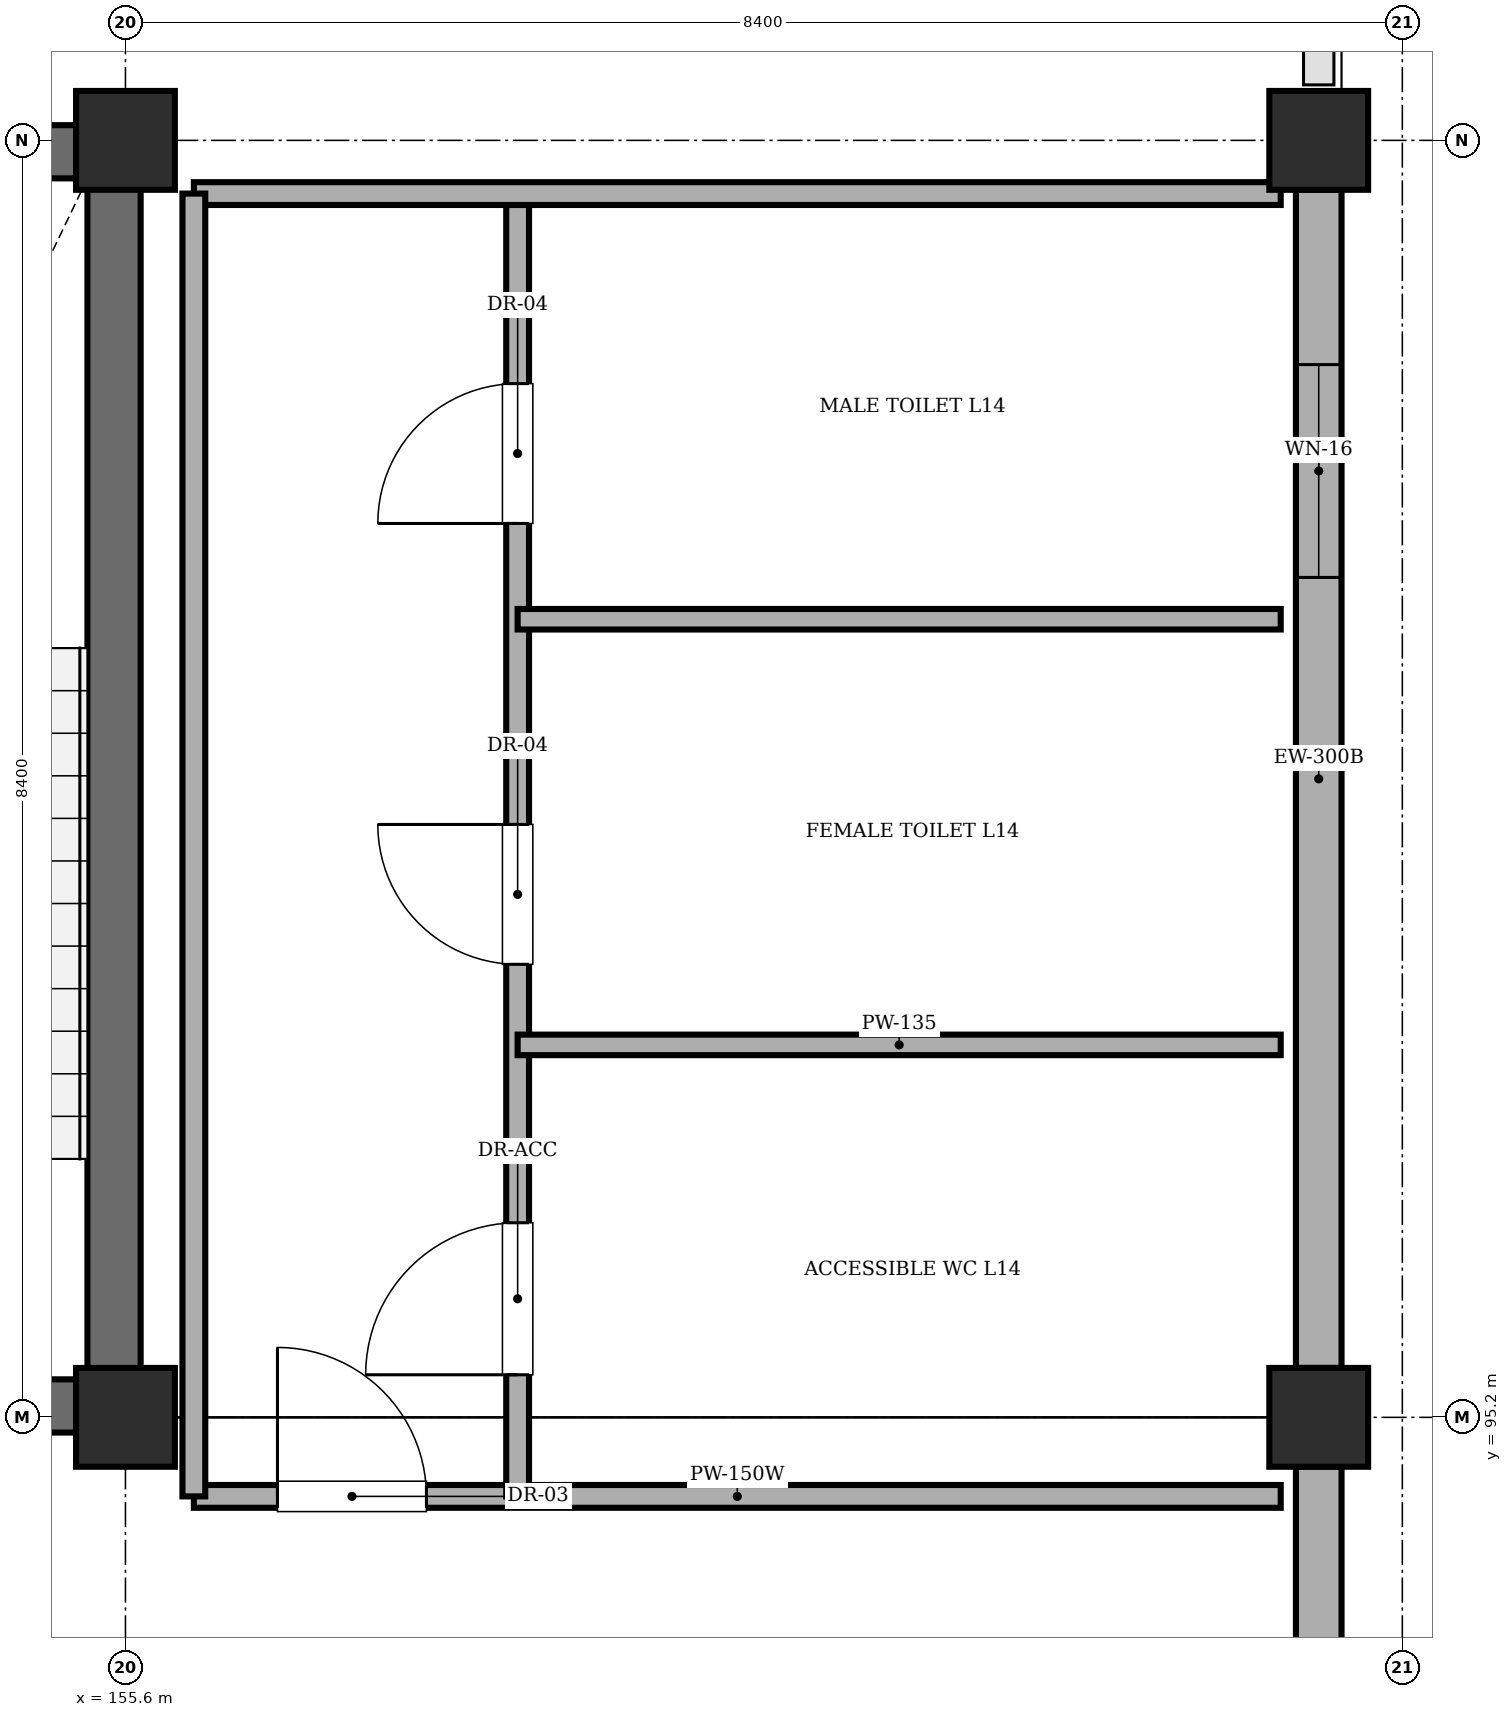
"""IFC4 building model, lengths in metres.
Left out: names, types, materials, properties, quantities, classifications, styles, units other than length and angle.
Written with IfcOpenShell. Run it as: python <this file> out.ifc"""

import sys

from ifc_helpers import new_model, si_unit, direction, frame, frame_2d, origin, origin_2d, place, context, subcontext, project, spatial, rectangle, extrude, element, fill, save


model = new_model("IFC4")
c1 = context("Model", 3, precision=1e-05, world=origin(), true_north=direction((0.0, 1.0)))
c2 = subcontext(c1, "Body", "Model", "MODEL_VIEW")
j1 = project(units=[si_unit("LENGTHUNIT", "METRE"), si_unit("PLANEANGLEUNIT", "RADIAN")], contexts=[c1])
p1 = place(None, origin())
s1 = spatial("IfcSite", under=j1, at=p1, CompositionType="ELEMENT")
p2 = place(p1, origin())
s2 = spatial("IfcBuilding", under=s1, at=p2, CompositionType="ELEMENT")
p3 = place(p2, frame((0.0, 0.0, 57.0)))
s3 = spatial("IfcBuildingStorey", under=s2, at=p3, CompositionType="ELEMENT", Elevation=57.0)
for number, where, z_axis, x_axis in (
    (1, (155.6, 95.2, 0.0), (0.0, 0.0, 1.0), (1.0, 0.0, 0.0)),
    (2, (155.6, 103.6, 0.0), (0.0, 0.0, 1.0), (1.0, 0.0, 0.0)),
    (3, (163.45, 95.2, 0.0), (0.0, 0.0, 1.0), (1.0, 0.0, 0.0)),
    (4, (163.45, 103.6, 0.0), (0.0, 0.0, 1.0), (1.0, 0.0, 0.0)),
):
    element("IfcColumn", number, at=place(p3, frame(where, z_axis=z_axis, x_axis=x_axis)), inside=s3, PredefinedType="COLUMN", context=c2, shape_type="SweptSolid", body=[
        extrude(rectangle(XDim=0.65, YDim=0.65, at=origin_2d()), origin(), (0.0, 0.0, 1.0), 4.02),
    ])
for number, where, z_axis, x_axis in (
    (5, (151.9, 95.275, 0.0), (0.0, 0.0, 1.0), (1.0, 0.0, 0.0)),
    (6, (151.9, 103.525, 0.0), (0.0, 0.0, 1.0), (1.0, 0.0, 0.0)),
):
    element("IfcWall", number, at=place(p3, frame(where, z_axis=z_axis, x_axis=x_axis)), inside=s3, PredefinedType="SHEAR", context=c2, shape_type="SweptSolid", body=[
        extrude(rectangle(XDim=3.8, YDim=0.35, at=frame_2d((1.9, 0.0))), origin(), (0.0, 0.0, 1.0), 4.02),
    ])
p4 = place(p3, frame((155.525, 95.45, 0.0), z_axis=(0.0, 0.0, 1.0), x_axis=(0.0, 1.0, 0.0)))
e7 = element("IfcWall", 7, at=p4, inside=s3, PredefinedType="SHEAR", context=c2, shape_type="SweptSolid", body=[
    extrude(rectangle(XDim=7.9, YDim=0.35, at=frame_2d((3.95, 0.0))), origin(), (0.0, 0.0, 1.0), 4.02),
])
p5 = place(p3, frame((163.45, 94.875, 0.0), z_axis=(0.0, 0.0, 1.0), x_axis=(0.0, -1.0, 0.0)))
e8 = element("IfcWall", 8, at=p5, inside=s3, PredefinedType="STANDARD", context=c2, shape_type="SweptSolid", body=[
    extrude(rectangle(XDim=7.75, YDim=0.3, at=frame_2d((3.875, 0.0))), origin(), (0.0, 0.0, 1.0), 3.32),
])
p6 = place(p5, frame((4.2, 0.0, 1.1)))
e9 = element("IfcOpeningElement", 9, at=p6, cuts=e8, PredefinedType="OPENING", context=c2, shape_type="SweptSolid", body=[
    extrude(rectangle(XDim=1.8, YDim=1.8, at=frame_2d((0.9, 0.9))), frame((0.0, 0.16, 0.0), z_axis=(0.0, -1.0, 0.0), x_axis=(1.0, 0.0, 0.0)), (0.0, 0.0, 1.0), 0.32),
])
p7 = place(p3, frame((163.45, 103.275, 0.0), z_axis=(0.0, 0.0, 1.0), x_axis=(0.0, -1.0, 0.0)))
e10 = element("IfcWall", 10, at=p7, inside=s3, PredefinedType="STANDARD", context=c2, shape_type="SweptSolid", body=[
    extrude(rectangle(XDim=7.75, YDim=0.3, at=frame_2d((3.875, 0.0))), origin(), (0.0, 0.0, 1.0), 3.32),
])
p8 = place(p7, frame((1.15, 0.0, 1.1)))
e11 = element("IfcOpeningElement", 11, at=p8, cuts=e10, PredefinedType="OPENING", context=c2, shape_type="SweptSolid", body=[
    extrude(rectangle(XDim=1.4, YDim=1.4, at=frame_2d((0.7, 0.7))), frame((0.0, 0.16, 0.0), z_axis=(0.0, -1.0, 0.0), x_axis=(1.0, 0.0, 0.0)), (0.0, 0.0, 1.0), 0.32),
])
p9 = place(p3, frame((156.05, 94.68, 0.0), z_axis=(0.0, 0.0, 1.0), x_axis=(1.0, 0.0, 0.0)))
e12 = element("IfcWall", 12, at=p9, inside=s3, PredefinedType="PARTITIONING", context=c2, shape_type="SweptSolid", body=[
    extrude(rectangle(XDim=7.15, YDim=0.15, at=frame_2d((3.575, 0.0))), origin(), (0.0, 0.0, 1.0), 4.02),
])
p10 = place(p9, frame((0.55, 0.0, 0.0)))
e13 = element("IfcOpeningElement", 13, at=p10, cuts=e12, PredefinedType="OPENING", context=c2, shape_type="SweptSolid", body=[
    extrude(rectangle(XDim=0.98, YDim=2.12, at=frame_2d((0.49, 1.06))), frame((0.0, 0.085, 0.0), z_axis=(0.0, -1.0, 0.0), x_axis=(1.0, 0.0, 0.0)), (0.0, 0.0, 1.0), 0.17),
])
p11 = place(p3, frame((158.18, 94.68, 0.0), z_axis=(0.0, 0.0, 1.0), x_axis=(0.0, 1.0, 0.0)))
e14 = element("IfcWall", 14, at=p11, inside=s3, PredefinedType="PARTITIONING", context=c2, shape_type="SweptSolid", body=[
    extrude(rectangle(XDim=8.57, YDim=0.15, at=frame_2d((4.285, 0.0))), origin(), (0.0, 0.0, 1.0), 4.02),
])
p12 = place(p11, frame((0.8, 0.0, 0.0)))
e15 = element("IfcOpeningElement", 15, at=p12, cuts=e14, PredefinedType="OPENING", context=c2, shape_type="SweptSolid", body=[
    extrude(rectangle(XDim=1.0, YDim=2.12, at=frame_2d((0.5, 1.06))), frame((0.0, 0.085, 0.0), z_axis=(0.0, -1.0, 0.0), x_axis=(1.0, 0.0, 0.0)), (0.0, 0.0, 1.0), 0.17),
])
p13 = place(p11, frame((3.5, 0.0, 0.0)))
e16 = element("IfcOpeningElement", 16, at=p13, cuts=e14, PredefinedType="OPENING", context=c2, shape_type="SweptSolid", body=[
    extrude(rectangle(XDim=0.92, YDim=2.1, at=frame_2d((0.46, 1.05))), frame((0.0, 0.085, 0.0), z_axis=(0.0, -1.0, 0.0), x_axis=(1.0, 0.0, 0.0)), (0.0, 0.0, 1.0), 0.17),
])
p14 = place(p11, frame((6.4, 0.0, 0.0)))
e17 = element("IfcOpeningElement", 17, at=p14, cuts=e14, PredefinedType="OPENING", context=c2, shape_type="SweptSolid", body=[
    extrude(rectangle(XDim=0.92, YDim=2.1, at=frame_2d((0.46, 1.05))), frame((0.0, 0.085, 0.0), z_axis=(0.0, -1.0, 0.0), x_axis=(1.0, 0.0, 0.0)), (0.0, 0.0, 1.0), 0.17),
])
for number, where, z_axis, x_axis in (
    (18, (158.18, 97.65, 0.0), (0.0, 0.0, 1.0), (1.0, 0.0, 0.0)),
    (19, (158.18, 100.45, 0.0), (0.0, 0.0, 1.0), (1.0, 0.0, 0.0)),
):
    element("IfcWall", number, at=place(p3, frame(where, z_axis=z_axis, x_axis=x_axis)), inside=s3, PredefinedType="PARTITIONING", context=c2, shape_type="SweptSolid", body=[
        extrude(rectangle(XDim=5.02, YDim=0.135, at=frame_2d((2.51, 0.0))), origin(), (0.0, 0.0, 1.0), 4.02),
    ])
p15 = place(p3, frame((156.05, 103.25, 0.0), z_axis=(0.0, 0.0, 1.0), x_axis=(1.0, 0.0, 0.0)))
e20 = element("IfcWall", 20, at=p15, inside=s3, PredefinedType="PARTITIONING", context=c2, shape_type="SweptSolid", body=[
    extrude(rectangle(XDim=7.15, YDim=0.15, at=frame_2d((3.575, 0.0))), origin(), (0.0, 0.0, 1.0), 4.02),
])
p16 = place(p3, frame((156.05, 94.68, 0.0), z_axis=(0.0, 0.0, 1.0), x_axis=(0.0, 1.0, 0.0)))
e21 = element("IfcWall", 21, at=p16, inside=s3, PredefinedType="PARTITIONING", context=c2, shape_type="SweptSolid", body=[
    extrude(rectangle(XDim=8.57, YDim=0.15, at=frame_2d((4.285, 0.0))), origin(), (0.0, 0.0, 1.0), 4.02),
])
p17 = place(p8, origin())
e22 = element("IfcWindow", 22, at=p17, inside=s3, PartitioningType="SINGLE_PANEL", PredefinedType="WINDOW", context=c2, shape_type="SweptSolid", body=[
    extrude(rectangle(XDim=1.4, YDim=1.4, at=frame_2d((0.7, 0.7))), frame((0.0, 0.03, 0.0), z_axis=(0.0, -1.0, 0.0), x_axis=(1.0, 0.0, 0.0)), (0.0, 0.0, 1.0), 0.06),
])
fill(e11, e22)
p18 = place(p10, origin())
e23 = element("IfcDoor", 23, at=p18, inside=s3, OperationType="SINGLE_SWING_LEFT", PredefinedType="DOOR", context=c2, shape_type="SweptSolid", body=[
    extrude(rectangle(XDim=0.98, YDim=2.12, at=frame_2d((0.49, 1.06))), frame((0.0, 0.025, 0.0), z_axis=(0.0, -1.0, 0.0), x_axis=(1.0, 0.0, 0.0)), (0.0, 0.0, 1.0), 0.05),
])
fill(e13, e23)
p19 = place(p12, origin())
e24 = element("IfcDoor", 24, at=p19, inside=s3, OperationType="SINGLE_SWING_LEFT", PredefinedType="DOOR", context=c2, shape_type="SweptSolid", body=[
    extrude(rectangle(XDim=1.0, YDim=2.12, at=frame_2d((0.5, 1.06))), frame((0.0, 0.025, 0.0), z_axis=(0.0, -1.0, 0.0), x_axis=(1.0, 0.0, 0.0)), (0.0, 0.0, 1.0), 0.05),
])
fill(e15, e24)
p20 = place(p13, origin())
e25 = element("IfcDoor", 25, at=p20, inside=s3, OperationType="SINGLE_SWING_RIGHT", PredefinedType="DOOR", context=c2, shape_type="SweptSolid", body=[
    extrude(rectangle(XDim=0.92, YDim=2.1, at=frame_2d((0.46, 1.05))), frame((0.0, 0.025, 0.0), z_axis=(0.0, -1.0, 0.0), x_axis=(1.0, 0.0, 0.0)), (0.0, 0.0, 1.0), 0.05),
])
fill(e16, e25)
p21 = place(p14, origin())
e26 = element("IfcDoor", 26, at=p21, inside=s3, OperationType="SINGLE_SWING_LEFT", PredefinedType="DOOR", context=c2, shape_type="SweptSolid", body=[
    extrude(rectangle(XDim=0.92, YDim=2.1, at=frame_2d((0.46, 1.05))), frame((0.0, 0.025, 0.0), z_axis=(0.0, -1.0, 0.0), x_axis=(1.0, 0.0, 0.0)), (0.0, 0.0, 1.0), 0.05),
])
fill(e17, e26)
save(model, sys.argv[1])
